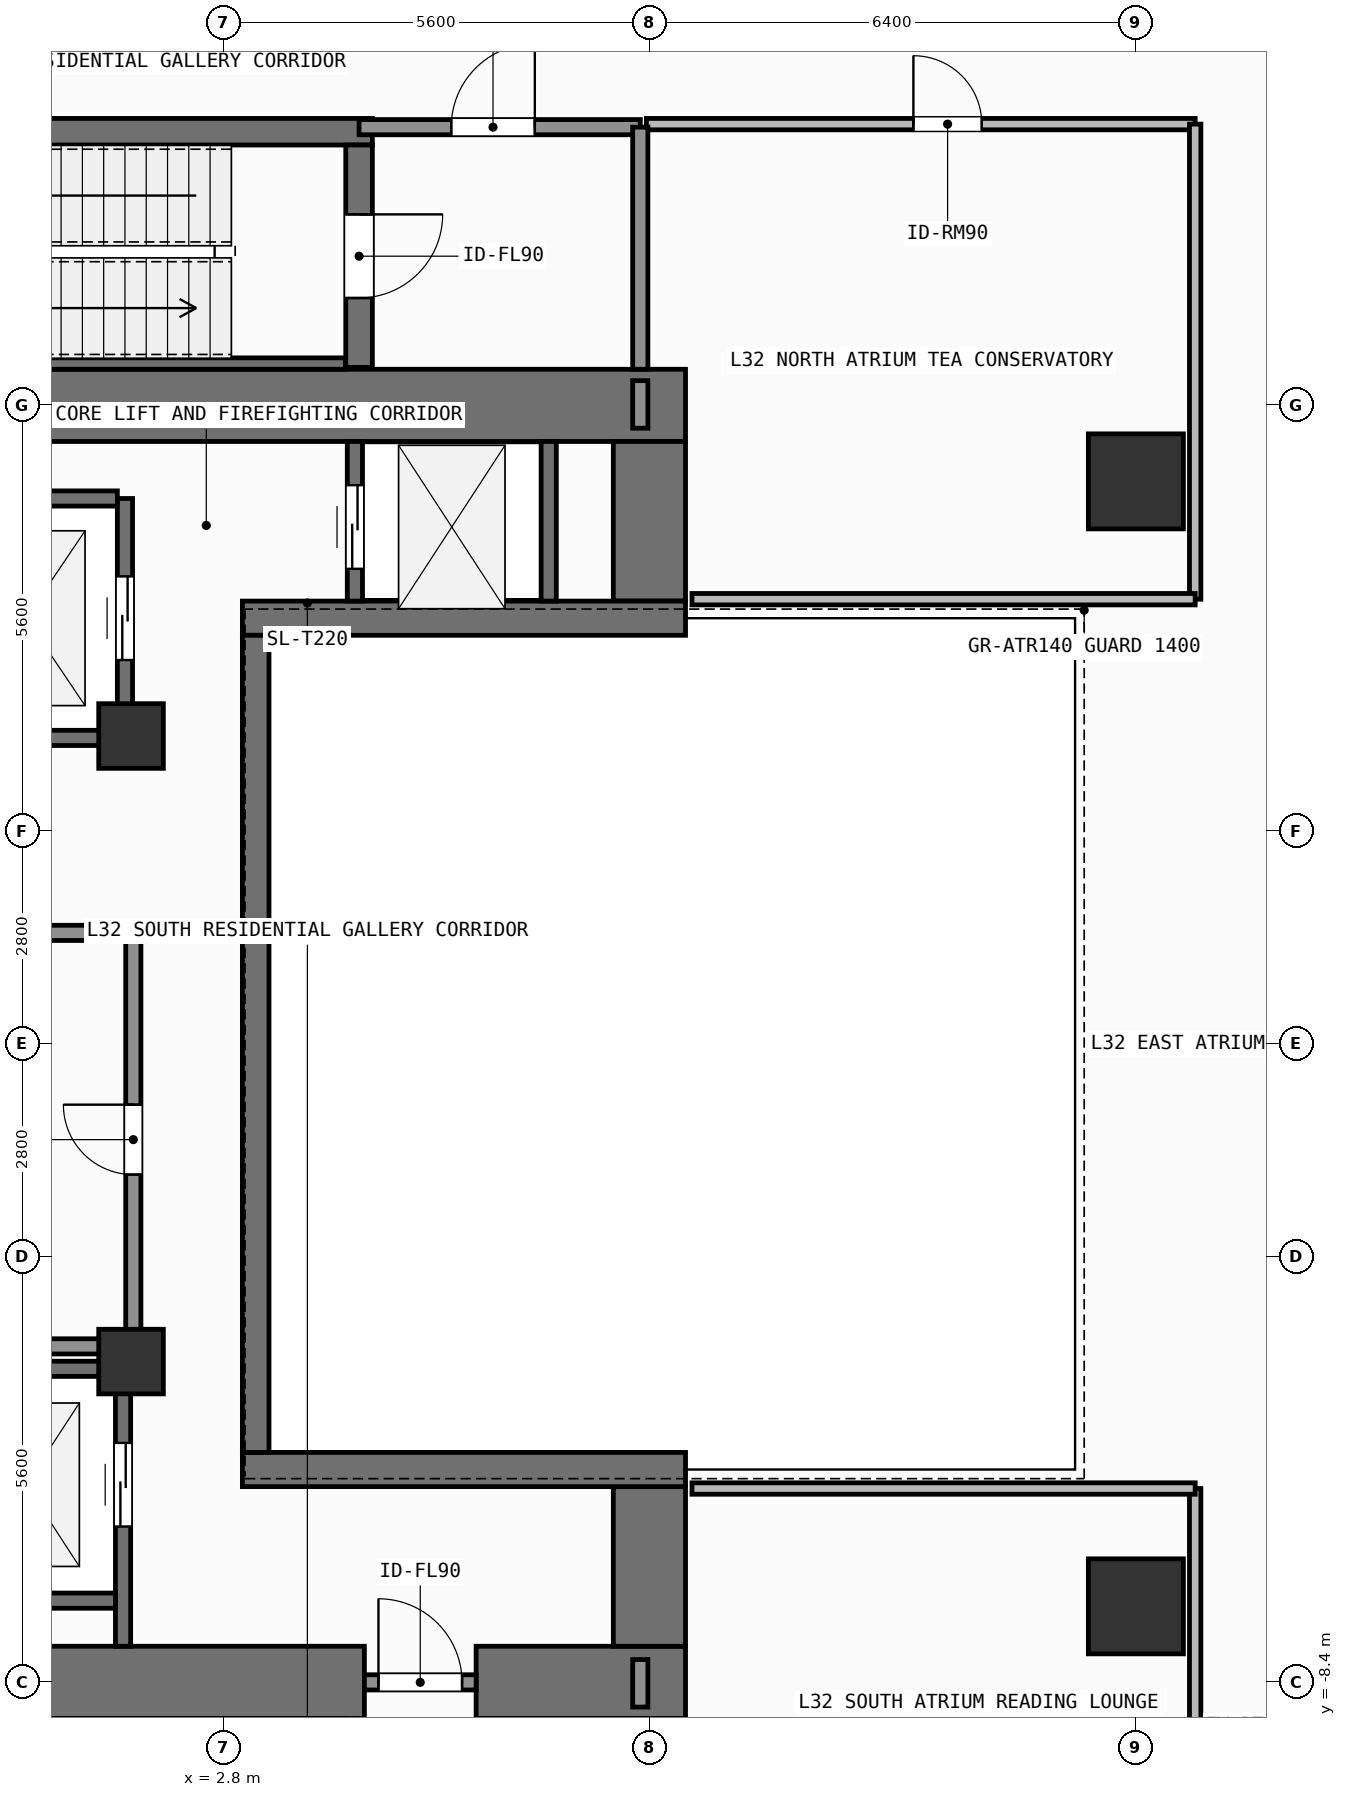
"""IFC4 building model, lengths in metres.
Left out: names, types, materials, properties, quantities, classifications, styles, units other than length and angle.
Written with IfcOpenShell. Run it as: python <this file> out.ifc"""

import sys

from ifc_helpers import new_model, si_unit, direction, frame, frame_2d, origin, origin_2d, place, context, subcontext, project, spatial, rectangle, extrude, element, fill, save


model = new_model("IFC4")
c1 = context("Model", 3, precision=1e-05, world=origin(), true_north=direction((0.0, 1.0)))
c2 = subcontext(c1, "Body", "Model", "MODEL_VIEW")
j1 = project(units=[si_unit("LENGTHUNIT", "METRE"), si_unit("PLANEANGLEUNIT", "RADIAN")], contexts=[c1])
p1 = place(None, origin())
s1 = spatial("IfcSite", under=j1, at=p1, CompositionType="ELEMENT")
p2 = place(p1, origin())
s2 = spatial("IfcBuilding", under=s1, at=p2, CompositionType="ELEMENT")
p3 = place(p2, frame((0.0, 0.0, 129.0)))
s3 = spatial("IfcBuildingStorey", under=s2, at=p3, CompositionType="ELEMENT", Elevation=129.0)
p4 = place(p3, frame((-2.62, -8.4, 0.0), z_axis=(0.0, 0.0, 1.0), x_axis=(1.0, 0.0, 0.0)))
e1 = element("IfcWall", 1, at=p4, inside=s3, PredefinedType="SHEAR", context=c2, shape_type="SweptSolid", body=[
    extrude(rectangle(XDim=7.27, YDim=0.95, at=frame_2d((3.635, 0.0))), origin(), (0.0, 0.0, 1.0), 3.9),
])
p5 = place(p3, frame((6.12, -8.4, 0.0), z_axis=(0.0, 0.0, 1.0), x_axis=(1.0, 0.0, 0.0)))
e2 = element("IfcWall", 2, at=p5, inside=s3, PredefinedType="SHEAR", context=c2, shape_type="SweptSolid", body=[
    extrude(rectangle(XDim=2.755, YDim=0.95, at=frame_2d((1.377, 0.0))), origin(), (0.0, 0.0, 1.0), 3.9),
])
p6 = place(p3, frame((-7.55, 8.4, 0.0), z_axis=(0.0, 0.0, 1.0), x_axis=(1.0, 0.0, 0.0)))
e3 = element("IfcWall", 3, at=p6, inside=s3, PredefinedType="SHEAR", context=c2, shape_type="SweptSolid", body=[
    extrude(rectangle(XDim=16.425, YDim=0.95, at=frame_2d((8.212, 0.0))), origin(), (0.0, 0.0, 1.0), 3.9),
])
for number, where, z_axis, x_axis in (
    (4, (8.4, -7.925, 0.0), (0.0, 0.0, 1.0), (0.0, 1.0, 0.0)),
    (5, (8.4, 5.825, 0.0), (0.0, 0.0, 1.0), (0.0, 1.0, 0.0)),
):
    element("IfcWall", number, at=place(p3, frame(where, z_axis=z_axis, x_axis=x_axis)), inside=s3, PredefinedType="SHEAR", context=c2, shape_type="SweptSolid", body=[
        extrude(rectangle(XDim=2.1, YDim=0.95, at=frame_2d((1.05, 0.0))), origin(), (0.0, 0.0, 1.0), 3.9),
    ])
for number, where, z_axis, x_axis in (
    (6, (3.045, -5.6, 0.0), (0.0, 0.0, 1.0), (1.0, 0.0, 0.0)),
    (7, (3.045, 5.6, 0.0), (0.0, 0.0, 1.0), (1.0, 0.0, 0.0)),
):
    element("IfcWall", number, at=place(p3, frame(where, z_axis=z_axis, x_axis=x_axis)), inside=s3, PredefinedType="SHEAR", context=c2, shape_type="SweptSolid", body=[
        extrude(rectangle(XDim=5.83, YDim=0.45, at=frame_2d((2.915, 0.0))), origin(), (0.0, 0.0, 1.0), 3.9),
    ])
p7 = place(p3, frame((3.22, -5.375, 0.0), z_axis=(0.0, 0.0, 1.0), x_axis=(0.0, 1.0, 0.0)))
e8 = element("IfcWall", 8, at=p7, inside=s3, PredefinedType="SHEAR", context=c2, shape_type="SweptSolid", body=[
    extrude(rectangle(XDim=10.75, YDim=0.35, at=frame_2d((5.375, 0.0))), origin(), (0.0, 0.0, 1.0), 3.9),
])
p8 = place(p3, frame((-2.555, 12.0, 0.0), z_axis=(0.0, 0.0, 1.0), x_axis=(1.0, 0.0, 0.0)))
e9 = element("IfcWall", 9, at=p8, inside=s3, PredefinedType="SHEAR", context=c2, shape_type="SweptSolid", body=[
    extrude(rectangle(XDim=7.31, YDim=0.35, at=frame_2d((3.655, 0.0))), origin(), (0.0, 0.0, 1.0), 3.9),
])
p9 = place(p3, frame((-2.2, 8.95, 0.0), z_axis=(0.0, 0.0, 1.0), x_axis=(1.0, 0.0, 0.0)))
e10 = element("IfcWall", 10, at=p9, inside=s3, PredefinedType="SHEAR", context=c2, shape_type="SweptSolid", body=[
    extrude(rectangle(XDim=6.6, YDim=0.15, at=frame_2d((3.3, 0.0))), origin(), (0.0, 0.0, 1.0), 3.9),
])
p10 = place(p3, frame((4.58, 11.825, 0.0), z_axis=(0.0, 0.0, 1.0), x_axis=(0.0, -1.0, 0.0)))
e11 = element("IfcWall", 11, at=p10, inside=s3, PredefinedType="SHEAR", context=c2, shape_type="SweptSolid", body=[
    extrude(rectangle(XDim=2.925, YDim=0.35, at=frame_2d((1.462, 0.0))), origin(), (0.0, 0.0, 1.0), 3.9),
])
p11 = place(p10, frame((0.913, 0.0, 0.0)))
e12 = element("IfcOpeningElement", 12, at=p11, cuts=e11, PredefinedType="OPENING", context=c2, shape_type="SweptSolid", body=[
    extrude(rectangle(XDim=1.1, YDim=2.15, at=frame_2d((0.55, 1.075))), frame((0.0, 0.185, 0.0), z_axis=(0.0, -1.0, 0.0), x_axis=(1.0, 0.0, 0.0)), (0.0, 0.0, 1.0), 0.37),
])
for number, where, z_axis, x_axis in (
    (13, (14.8, -7.4, 0.0), (0.0, 0.0, 1.0), (1.0, 0.0, 0.0)),
    (14, (14.8, 7.4, 0.0), (0.0, 0.0, 1.0), (1.0, 0.0, 0.0)),
):
    element("IfcColumn", number, at=place(p3, frame(where, z_axis=z_axis, x_axis=x_axis)), inside=s3, PredefinedType="COLUMN", context=c2, shape_type="SweptSolid", body=[
        extrude(rectangle(XDim=1.25, YDim=1.25, at=origin_2d()), origin(), (0.0, 0.0, 1.0), 3.9),
    ])
for number, where, z_axis, x_axis in (
    (15, (1.58, -4.18, 0.0), (0.0, 0.0, 1.0), (1.0, 0.0, 0.0)),
    (16, (1.58, 4.05, 0.0), (0.0, 0.0, 1.0), (1.0, 0.0, 0.0)),
):
    element("IfcColumn", number, at=place(p3, frame(where, z_axis=z_axis, x_axis=x_axis)), inside=s3, PredefinedType="COLUMN", context=c2, shape_type="SweptSolid", body=[
        extrude(rectangle(XDim=0.85, YDim=0.85, at=origin_2d()), origin(), (0.0, 0.0, 1.0), 3.9),
    ])
p12 = place(p3, frame((1.5, 4.025, 0.0), z_axis=(0.0, 0.0, 1.0), x_axis=(0.0, 1.0, 0.0)))
e17 = element("IfcWall", 17, at=p12, inside=s3, PredefinedType="SHEAR", context=c2, shape_type="SweptSolid", body=[
    extrude(rectangle(XDim=3.15, YDim=0.2, at=frame_2d((1.575, 0.0))), origin(), (0.0, 0.0, 1.0), 3.68),
])
p13 = place(p12, frame((1.025, 0.0, 0.0)))
e18 = element("IfcOpeningElement", 18, at=p13, cuts=e17, PredefinedType="OPENING", context=c2, shape_type="SweptSolid", body=[
    extrude(rectangle(XDim=1.1, YDim=2.2, at=frame_2d((0.55, 1.1))), frame((0.0, 0.11, 0.0), z_axis=(0.0, -1.0, 0.0), x_axis=(1.0, 0.0, 0.0)), (0.0, 0.0, 1.0), 0.22),
])
for number, where, z_axis, x_axis in (
    (19, (-1.0, 4.025, 0.0), (0.0, 0.0, 1.0), (1.0, 0.0, 0.0)),
    (20, (-1.0, 7.175, 0.0), (0.0, 0.0, 1.0), (1.0, 0.0, 0.0)),
):
    element("IfcWall", number, at=place(p3, frame(where, z_axis=z_axis, x_axis=x_axis)), inside=s3, PredefinedType="SHEAR", context=c2, shape_type="SweptSolid", body=[
        extrude(rectangle(XDim=2.4, YDim=0.2, at=frame_2d((1.2, 0.0))), origin(), (0.0, 0.0, 1.0), 3.68),
    ])
p14 = place(p3, frame((1.475, -7.925, 0.0), z_axis=(0.0, 0.0, 1.0), x_axis=(0.0, 1.0, 0.0)))
e21 = element("IfcWall", 21, at=p14, inside=s3, PredefinedType="SHEAR", context=c2, shape_type="SweptSolid", body=[
    extrude(rectangle(XDim=3.65, YDim=0.2, at=frame_2d((1.825, 0.0))), origin(), (0.0, 0.0, 1.0), 3.68),
])
p15 = place(p14, frame((1.575, 0.0, 0.0)))
e22 = element("IfcOpeningElement", 22, at=p15, cuts=e21, PredefinedType="OPENING", context=c2, shape_type="SweptSolid", body=[
    extrude(rectangle(XDim=1.1, YDim=2.2, at=frame_2d((0.55, 1.1))), frame((0.0, 0.11, 0.0), z_axis=(0.0, -1.0, 0.0), x_axis=(1.0, 0.0, 0.0)), (0.0, 0.0, 1.0), 0.22),
])
for number, where, z_axis, x_axis in (
    (23, (-0.975, -7.325, 0.0), (0.0, 0.0, 1.0), (1.0, 0.0, 0.0)),
    (24, (-0.975, -4.275, 0.0), (0.0, 0.0, 1.0), (1.0, 0.0, 0.0)),
):
    element("IfcWall", number, at=place(p3, frame(where, z_axis=z_axis, x_axis=x_axis)), inside=s3, PredefinedType="SHEAR", context=c2, shape_type="SweptSolid", body=[
        extrude(rectangle(XDim=2.35, YDim=0.2, at=frame_2d((1.175, 0.0))), origin(), (0.0, 0.0, 1.0), 3.68),
    ])
p16 = place(p3, frame((4.525, 5.825, 0.0), z_axis=(0.0, 0.0, 1.0), x_axis=(0.0, 1.0, 0.0)))
e25 = element("IfcWall", 25, at=p16, inside=s3, PredefinedType="SHEAR", context=c2, shape_type="SweptSolid", body=[
    extrude(rectangle(XDim=2.1, YDim=0.2, at=frame_2d((1.05, 0.0))), origin(), (0.0, 0.0, 1.0), 3.68),
])
p17 = place(p16, frame((0.425, 0.0, 0.0)))
e26 = element("IfcOpeningElement", 26, at=p17, cuts=e25, PredefinedType="OPENING", context=c2, shape_type="SweptSolid", body=[
    extrude(rectangle(XDim=1.1, YDim=2.2, at=frame_2d((0.55, 1.1))), frame((0.0, 0.11, 0.0), z_axis=(0.0, -1.0, 0.0), x_axis=(1.0, 0.0, 0.0)), (0.0, 0.0, 1.0), 0.22),
])
p18 = place(p3, frame((7.075, 5.825, 0.0), z_axis=(0.0, 0.0, 1.0), x_axis=(0.0, 1.0, 0.0)))
e27 = element("IfcWall", 27, at=p18, inside=s3, PredefinedType="SHEAR", context=c2, shape_type="SweptSolid", body=[
    extrude(rectangle(XDim=2.1, YDim=0.2, at=frame_2d((1.05, 0.0))), origin(), (0.0, 0.0, 1.0), 3.68),
])
p19 = place(p3, frame((4.65, -8.4, 0.0), z_axis=(0.0, 0.0, 1.0), x_axis=(1.0, 0.0, 0.0)))
e28 = element("IfcWall", 28, at=p19, inside=s3, PredefinedType="SOLIDWALL", context=c2, shape_type="SweptSolid", body=[
    extrude(rectangle(XDim=1.47, YDim=0.2, at=frame_2d((0.735, 0.0))), origin(), (0.0, 0.0, 1.0), 2.72),
])
p20 = place(p19, frame((0.185, 0.0, 0.0)))
e29 = element("IfcOpeningElement", 29, at=p20, cuts=e28, PredefinedType="OPENING", context=c2, shape_type="SweptSolid", body=[
    extrude(rectangle(XDim=1.1, YDim=2.15, at=frame_2d((0.55, 1.075))), frame((0.0, 0.11, 0.0), z_axis=(0.0, -1.0, 0.0), x_axis=(1.0, 0.0, 0.0)), (0.0, 0.0, 1.0), 0.22),
])
p21 = place(p3, frame((4.58, 12.06, 0.0), z_axis=(0.0, 0.0, 1.0), x_axis=(1.0, 0.0, 0.0)))
e30 = element("IfcWall", 30, at=p21, inside=s3, PredefinedType="SOLIDWALL", context=c2, shape_type="SweptSolid", body=[
    extrude(rectangle(XDim=3.7, YDim=0.2, at=frame_2d((1.85, 0.0))), origin(), (0.0, 0.0, 1.0), 3.68),
])
p22 = place(p21, frame((1.212, 0.0, 0.0)))
e31 = element("IfcOpeningElement", 31, at=p22, cuts=e30, PredefinedType="OPENING", context=c2, shape_type="SweptSolid", body=[
    extrude(rectangle(XDim=1.1, YDim=2.15, at=frame_2d((0.55, 1.075))), frame((0.0, 0.11, 0.0), z_axis=(0.0, -1.0, 0.0), x_axis=(1.0, 0.0, 0.0)), (0.0, 0.0, 1.0), 0.22),
])
p23 = place(p3, frame((1.61, -3.98, 0.0), z_axis=(0.0, 0.0, 1.0), x_axis=(0.0, 1.0, 0.0)))
e32 = element("IfcWall", 32, at=p23, inside=s3, PredefinedType="SOLIDWALL", context=c2, shape_type="SweptSolid", body=[
    extrude(rectangle(XDim=5.44, YDim=0.2, at=frame_2d((2.72, 0.0))), origin(), (0.0, 0.0, 1.0), 3.68),
])
p24 = place(p23, frame((2.26, 0.0, 0.0)))
e33 = element("IfcOpeningElement", 33, at=p24, cuts=e32, PredefinedType="OPENING", context=c2, shape_type="SweptSolid", body=[
    extrude(rectangle(XDim=0.92, YDim=2.1, at=frame_2d((0.46, 1.05))), frame((0.0, 0.11, 0.0), z_axis=(0.0, -1.0, 0.0), x_axis=(1.0, 0.0, 0.0)), (0.0, 0.0, 1.0), 0.22),
])
p25 = place(p3, frame((8.36, 12.1, 0.0), z_axis=(0.0, 0.0, 1.0), x_axis=(1.0, 0.0, 0.0)))
e34 = element("IfcWall", 34, at=p25, inside=s3, PredefinedType="PARTITIONING", context=c2, shape_type="SweptSolid", body=[
    extrude(rectangle(XDim=7.22, YDim=0.15, at=frame_2d((3.61, 0.0))), origin(), (0.0, 0.0, 1.0), 3.68),
])
p26 = place(p25, frame((3.513, 0.0, 0.0)))
e35 = element("IfcOpeningElement", 35, at=p26, cuts=e34, PredefinedType="OPENING", context=c2, shape_type="SweptSolid", body=[
    extrude(rectangle(XDim=0.9, YDim=2.1, at=frame_2d((0.45, 1.05))), frame((0.0, 0.085, 0.0), z_axis=(0.0, -1.0, 0.0), x_axis=(1.0, 0.0, 0.0)), (0.0, 0.0, 1.0), 0.17),
])
p27 = place(p3, frame((8.28, 8.875, 0.0), z_axis=(0.0, 0.0, 1.0), x_axis=(0.0, 1.0, 0.0)))
e36 = element("IfcWall", 36, at=p27, inside=s3, PredefinedType="SOLIDWALL", context=c2, shape_type="SweptSolid", body=[
    extrude(rectangle(XDim=3.185, YDim=0.2, at=frame_2d((1.593, 0.0))), origin(), (0.0, 0.0, 1.0), 3.68),
])
for number, where, z_axis, x_axis in (
    (37, (-1.58, -3.98, 0.0), (0.0, 0.0, 1.0), (1.0, 0.0, 0.0)),
    (38, (-1.58, 1.46, 0.0), (0.0, 0.0, 1.0), (1.0, 0.0, 0.0)),
):
    element("IfcWall", number, at=place(p3, frame(where, z_axis=z_axis, x_axis=x_axis)), inside=s3, PredefinedType="SOLIDWALL", context=c2, shape_type="SweptSolid", body=[
        extrude(rectangle(XDim=3.19, YDim=0.2, at=frame_2d((1.595, 0.0))), origin(), (0.0, 0.0, 1.0), 3.68),
    ])
p28 = place(p3, frame((8.28, -8.725, 0.0), z_axis=(0.0, 0.0, 1.0), x_axis=(0.0, 1.0, 0.0)))
e39 = element("IfcWall", 39, at=p28, inside=s3, PredefinedType="SOLIDWALL", context=c2, shape_type="SweptSolid", body=[
    extrude(rectangle(XDim=0.625, YDim=0.2, at=frame_2d((0.312, 0.0))), origin(), (0.0, 0.0, 1.0), 3.68),
])
p29 = place(p3, frame((15.58, -12.1, 0.0), z_axis=(0.0, 0.0, 1.0), x_axis=(0.0, 1.0, 0.0)))
e40 = element("IfcWall", 40, at=p29, inside=s3, PredefinedType="PARTITIONING", context=c2, shape_type="SweptSolid", body=[
    extrude(rectangle(XDim=6.25, YDim=0.15, at=frame_2d((3.125, 0.0))), origin(), (0.0, 0.0, 1.0), 3.68),
])
p30 = place(p3, frame((8.96, -5.85, 0.0), z_axis=(0.0, 0.0, 1.0), x_axis=(1.0, 0.0, 0.0)))
e41 = element("IfcWall", 41, at=p30, inside=s3, PredefinedType="PARTITIONING", context=c2, shape_type="SweptSolid", body=[
    extrude(rectangle(XDim=6.62, YDim=0.15, at=frame_2d((3.31, 0.0))), origin(), (0.0, 0.0, 1.0), 3.68),
])
p31 = place(p3, frame((8.28, 8.1, 0.0), z_axis=(0.0, 0.0, 1.0), x_axis=(0.0, 1.0, 0.0)))
e42 = element("IfcWall", 42, at=p31, inside=s3, PredefinedType="SOLIDWALL", context=c2, shape_type="SweptSolid", body=[
    extrude(rectangle(XDim=0.625, YDim=0.2, at=frame_2d((0.312, 0.0))), origin(), (0.0, 0.0, 1.0), 3.68),
])
p32 = place(p3, frame((15.58, 5.85, 0.0), z_axis=(0.0, 0.0, 1.0), x_axis=(0.0, 1.0, 0.0)))
e43 = element("IfcWall", 43, at=p32, inside=s3, PredefinedType="PARTITIONING", context=c2, shape_type="SweptSolid", body=[
    extrude(rectangle(XDim=6.25, YDim=0.15, at=frame_2d((3.125, 0.0))), origin(), (0.0, 0.0, 1.0), 3.68),
])
p33 = place(p3, frame((8.96, 5.85, 0.0), z_axis=(0.0, 0.0, 1.0), x_axis=(1.0, 0.0, 0.0)))
e44 = element("IfcWall", 44, at=p33, inside=s3, PredefinedType="PARTITIONING", context=c2, shape_type="SweptSolid", body=[
    extrude(rectangle(XDim=6.62, YDim=0.15, at=frame_2d((3.31, 0.0))), origin(), (0.0, 0.0, 1.0), 3.68),
])
p34 = place(p13, origin())
e45 = element("IfcDoor", 45, at=p34, inside=s3, OperationType="SLIDING_TO_LEFT", PredefinedType="DOOR", context=c2, shape_type="SweptSolid", body=[
    extrude(rectangle(XDim=1.1, YDim=2.2, at=frame_2d((0.55, 1.1))), frame((0.0, 0.025, 0.0), z_axis=(0.0, -1.0, 0.0), x_axis=(1.0, 0.0, 0.0)), (0.0, 0.0, 1.0), 0.05),
])
fill(e18, e45)
p35 = place(p15, origin())
e46 = element("IfcDoor", 46, at=p35, inside=s3, OperationType="SLIDING_TO_LEFT", PredefinedType="DOOR", context=c2, shape_type="SweptSolid", body=[
    extrude(rectangle(XDim=1.1, YDim=2.2, at=frame_2d((0.55, 1.1))), frame((0.0, 0.025, 0.0), z_axis=(0.0, -1.0, 0.0), x_axis=(1.0, 0.0, 0.0)), (0.0, 0.0, 1.0), 0.05),
])
fill(e22, e46)
p36 = place(p17, origin())
e47 = element("IfcDoor", 47, at=p36, inside=s3, OperationType="SLIDING_TO_LEFT", PredefinedType="DOOR", context=c2, shape_type="SweptSolid", body=[
    extrude(rectangle(XDim=1.1, YDim=2.2, at=frame_2d((0.55, 1.1))), frame((0.0, 0.025, 0.0), z_axis=(0.0, -1.0, 0.0), x_axis=(1.0, 0.0, 0.0)), (0.0, 0.0, 1.0), 0.05),
])
fill(e26, e47)
p37 = place(p11, origin())
e48 = element("IfcDoor", 48, at=p37, inside=s3, OperationType="SINGLE_SWING_LEFT", PredefinedType="DOOR", context=c2, shape_type="SweptSolid", body=[
    extrude(rectangle(XDim=1.1, YDim=2.15, at=frame_2d((0.55, 1.075))), frame((0.0, 0.025, 0.0), z_axis=(0.0, -1.0, 0.0), x_axis=(1.0, 0.0, 0.0)), (0.0, 0.0, 1.0), 0.05),
])
fill(e12, e48)
p38 = place(p20, origin())
e49 = element("IfcDoor", 49, at=p38, inside=s3, OperationType="SINGLE_SWING_LEFT", PredefinedType="DOOR", context=c2, shape_type="SweptSolid", body=[
    extrude(rectangle(XDim=1.1, YDim=2.15, at=frame_2d((0.55, 1.075))), frame((0.0, 0.025, 0.0), z_axis=(0.0, -1.0, 0.0), x_axis=(1.0, 0.0, 0.0)), (0.0, 0.0, 1.0), 0.05),
])
fill(e29, e49)
p39 = place(p22, origin())
e50 = element("IfcDoor", 50, at=p39, inside=s3, OperationType="SINGLE_SWING_RIGHT", PredefinedType="DOOR", context=c2, shape_type="SweptSolid", body=[
    extrude(rectangle(XDim=1.1, YDim=2.15, at=frame_2d((0.55, 1.075))), frame((0.0, 0.025, 0.0), z_axis=(0.0, -1.0, 0.0), x_axis=(1.0, 0.0, 0.0)), (0.0, 0.0, 1.0), 0.05),
])
fill(e31, e50)
p40 = place(p24, origin())
e51 = element("IfcDoor", 51, at=p40, inside=s3, OperationType="SINGLE_SWING_RIGHT", PredefinedType="DOOR", context=c2, shape_type="SweptSolid", body=[
    extrude(rectangle(XDim=0.92, YDim=2.1, at=frame_2d((0.46, 1.05))), frame((0.0, 0.025, 0.0), z_axis=(0.0, -1.0, 0.0), x_axis=(1.0, 0.0, 0.0)), (0.0, 0.0, 1.0), 0.05),
])
fill(e33, e51)
p41 = place(p26, origin())
e52 = element("IfcDoor", 52, at=p41, inside=s3, OperationType="SINGLE_SWING_LEFT", PredefinedType="DOOR", context=c2, shape_type="SweptSolid", body=[
    extrude(rectangle(XDim=0.9, YDim=2.1, at=frame_2d((0.45, 1.05))), frame((0.0, 0.025, 0.0), z_axis=(0.0, -1.0, 0.0), x_axis=(1.0, 0.0, 0.0)), (0.0, 0.0, 1.0), 0.05),
])
fill(e35, e52)
save(model, sys.argv[1])
